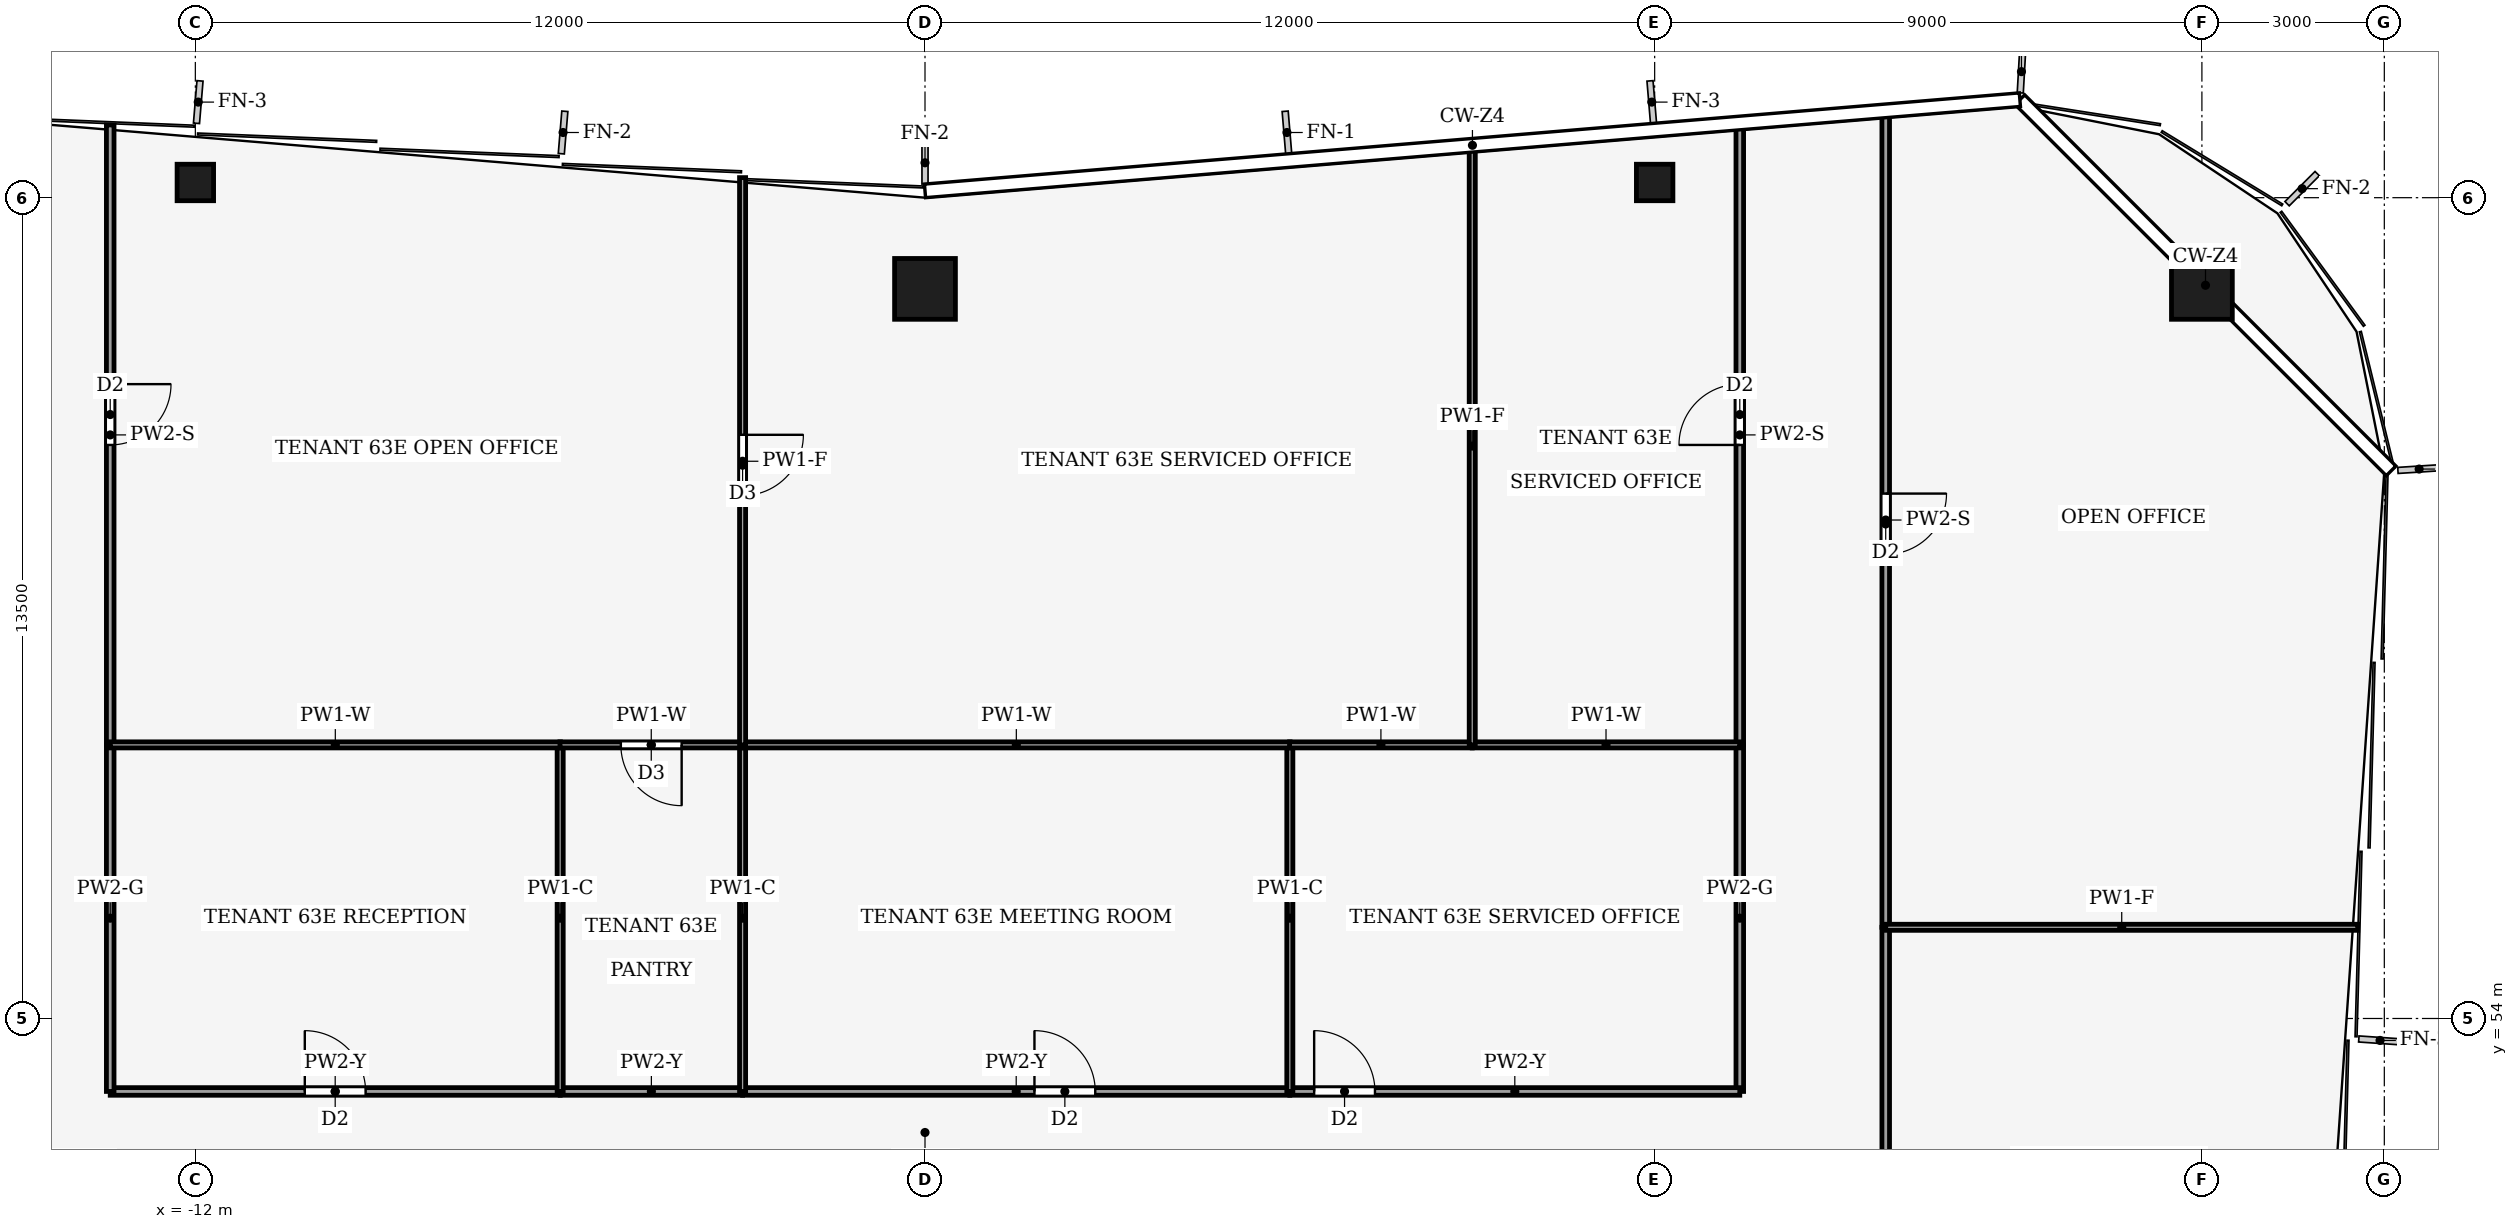
"""IFC4 building model, lengths in metres.
Left out: names, types, materials, properties, quantities, classifications, styles, units other than length and angle.
Written with IfcOpenShell. Run it as: python <this file> out.ifc"""

import sys

from ifc_helpers import new_model, si_unit, direction, frame, frame_2d, origin, origin_2d, place, context, subcontext, project, spatial, rectangle, hollow_rectangle, extrude, element, fill, save


model = new_model("IFC4")
c1 = context("Model", 3, precision=1e-05, world=origin(), true_north=direction((0.0, 1.0)))
c2 = subcontext(c1, "Body", "Model", "MODEL_VIEW")
j1 = project(units=[si_unit("LENGTHUNIT", "METRE"), si_unit("PLANEANGLEUNIT", "RADIAN")], contexts=[c1])
p1 = place(None, origin())
s1 = spatial("IfcSite", under=j1, at=p1, CompositionType="ELEMENT")
p2 = place(p1, origin())
s2 = spatial("IfcBuilding", under=s1, at=p2, CompositionType="ELEMENT")
p3 = place(p2, frame((0.0, 0.0, 274.0)))
s3 = spatial("IfcBuildingStorey", under=s2, at=p3, CompositionType="ELEMENT", Elevation=274.0)
for number, where, z_axis, x_axis in (
    (1, (0.0, 66.0, 0.0), (0.0, 0.0, 1.0), (1.0, 0.0, 0.0)),
    (2, (21.0, 66.0, 0.0), (0.0, 0.0, 1.0), (1.0, 0.0, 0.0)),
):
    element("IfcColumn", number, at=place(p3, frame(where, z_axis=z_axis, x_axis=x_axis)), inside=s3, PredefinedType="COLUMN", context=c2, shape_type="SweptSolid", body=[
        extrude(hollow_rectangle(XDim=1.0, YDim=1.0, WallThickness=0.045, at=origin_2d()), origin(), (0.0, 0.0, 1.0), 4.0),
    ])
for number, where, z_axis, x_axis in (
    (3, (-12.0, 67.75, 0.0), (0.0, 0.0, 1.0), (1.0, 0.0, 0.0)),
    (4, (12.0, 67.75, 0.0), (0.0, 0.0, 1.0), (1.0, 0.0, 0.0)),
):
    element("IfcColumn", number, at=place(p3, frame(where, z_axis=z_axis, x_axis=x_axis)), inside=s3, PredefinedType="COLUMN", context=c2, shape_type="SweptSolid", body=[
        extrude(hollow_rectangle(XDim=0.6, YDim=0.6, WallThickness=0.025, at=origin_2d()), origin(), (0.0, 0.0, 1.0), 4.0),
    ])
p4 = place(p3, frame((15.8, 55.5, 0.0), z_axis=(0.0, 0.0, 1.0), x_axis=(0.0, -1.0, 0.0)))
e5 = element("IfcWall", 5, at=p4, inside=s3, PredefinedType="PARTITIONING", context=c2, shape_type="SweptSolid", body=[
    extrude(rectangle(XDim=9.0, YDim=0.125, at=frame_2d((4.5, 0.0))), origin(), (0.0, 0.0, 1.0), 3.24),
])
p5 = place(p4, frame((4.0, 0.0, 0.0)))
e6 = element("IfcOpeningElement", 6, at=p5, cuts=e5, PredefinedType="OPENING", context=c2, shape_type="SweptSolid", body=[
    extrude(rectangle(XDim=1.0, YDim=2.1, at=frame_2d((0.5, 1.05))), frame((0.0, 0.073, 0.0), z_axis=(0.0, -1.0, 0.0), x_axis=(1.0, 0.0, 0.0)), (0.0, 0.0, 1.0), 0.145),
])
p6 = place(p3, frame((15.8, 68.897, 0.0), z_axis=(0.0, 0.0, 1.0), x_axis=(0.0, -1.0, 0.0)))
e7 = element("IfcWall", 7, at=p6, inside=s3, PredefinedType="PARTITIONING", context=c2, shape_type="SweptSolid", body=[
    extrude(rectangle(XDim=13.397, YDim=0.125, at=frame_2d((6.698, 0.0))), origin(), (0.0, 0.0, 1.0), 3.04),
])
p7 = place(p6, frame((6.263, 0.0, 0.0)))
e8 = element("IfcOpeningElement", 8, at=p7, cuts=e7, PredefinedType="OPENING", context=c2, shape_type="SweptSolid", body=[
    extrude(rectangle(XDim=1.0, YDim=2.1, at=frame_2d((0.5, 1.05))), frame((0.0, 0.073, 0.0), z_axis=(0.0, -1.0, 0.0), x_axis=(1.0, 0.0, 0.0)), (0.0, 0.0, 1.0), 0.145),
])
p8 = place(p3, frame((-13.4, 52.8, 0.0), z_axis=(0.0, 0.0, 1.0), x_axis=(1.0, 0.0, 0.0)))
e9 = element("IfcWall", 9, at=p8, inside=s3, PredefinedType="PARTITIONING", context=c2, shape_type="SweptSolid", body=[
    extrude(rectangle(XDim=7.4, YDim=0.125, at=frame_2d((3.7, 0.0))), origin(), (0.0, 0.0, 1.0), 3.24),
])
p9 = place(p8, frame((3.2, 0.0, 0.0)))
e10 = element("IfcOpeningElement", 10, at=p9, cuts=e9, PredefinedType="OPENING", context=c2, shape_type="SweptSolid", body=[
    extrude(rectangle(XDim=1.0, YDim=2.1, at=frame_2d((0.5, 1.05))), frame((0.0, 0.073, 0.0), z_axis=(0.0, -1.0, 0.0), x_axis=(1.0, 0.0, 0.0)), (0.0, 0.0, 1.0), 0.145),
])
p10 = place(p3, frame((-13.4, 52.8, 0.0), z_axis=(0.0, 0.0, 1.0), x_axis=(0.0, 1.0, 0.0)))
e11 = element("IfcWall", 11, at=p10, inside=s3, PredefinedType="PARTITIONING", context=c2, shape_type="SweptSolid", body=[
    extrude(rectangle(XDim=5.7, YDim=0.125, at=frame_2d((2.85, 0.0))), origin(), (0.0, 0.0, 1.0), 3.87),
])
p11 = place(p3, frame((-3.0, 52.8, 0.0), z_axis=(0.0, 0.0, 1.0), x_axis=(-1.0, 0.0, 0.0)))
e12 = element("IfcWall", 12, at=p11, inside=s3, PredefinedType="PARTITIONING", context=c2, shape_type="SweptSolid", body=[
    extrude(rectangle(XDim=3.0, YDim=0.125, at=frame_2d((1.5, 0.0))), origin(), (0.0, 0.0, 1.0), 3.24),
])
p12 = place(p3, frame((-3.0, 52.8, 0.0), z_axis=(0.0, 0.0, 1.0), x_axis=(1.0, 0.0, 0.0)))
e13 = element("IfcWall", 13, at=p12, inside=s3, PredefinedType="PARTITIONING", context=c2, shape_type="SweptSolid", body=[
    extrude(rectangle(XDim=9.0, YDim=0.125, at=frame_2d((4.5, 0.0))), origin(), (0.0, 0.0, 1.0), 3.24),
])
p13 = place(p12, frame((4.8, 0.0, 0.0)))
e14 = element("IfcOpeningElement", 14, at=p13, cuts=e13, PredefinedType="OPENING", context=c2, shape_type="SweptSolid", body=[
    extrude(rectangle(XDim=1.0, YDim=2.1, at=frame_2d((0.5, 1.05))), frame((0.0, 0.073, 0.0), z_axis=(0.0, -1.0, 0.0), x_axis=(1.0, 0.0, 0.0)), (0.0, 0.0, 1.0), 0.145),
])
p14 = place(p3, frame((13.4, 52.8, 0.0), z_axis=(0.0, 0.0, 1.0), x_axis=(0.0, 1.0, 0.0)))
e15 = element("IfcWall", 15, at=p14, inside=s3, PredefinedType="PARTITIONING", context=c2, shape_type="SweptSolid", body=[
    extrude(rectangle(XDim=5.7, YDim=0.125, at=frame_2d((2.85, 0.0))), origin(), (0.0, 0.0, 1.0), 3.87),
])
p15 = place(p3, frame((6.0, 52.8, 0.0), z_axis=(0.0, 0.0, 1.0), x_axis=(1.0, 0.0, 0.0)))
e16 = element("IfcWall", 16, at=p15, inside=s3, PredefinedType="PARTITIONING", context=c2, shape_type="SweptSolid", body=[
    extrude(rectangle(XDim=7.4, YDim=0.125, at=frame_2d((3.7, 0.0))), origin(), (0.0, 0.0, 1.0), 3.24),
])
p16 = place(p15, frame((0.4, 0.0, 0.0)))
e17 = element("IfcOpeningElement", 17, at=p16, cuts=e16, PredefinedType="OPENING", context=c2, shape_type="SweptSolid", body=[
    extrude(rectangle(XDim=1.0, YDim=2.1, at=frame_2d((0.5, 1.05))), frame((0.0, 0.073, 0.0), z_axis=(0.0, -1.0, 0.0), x_axis=(1.0, 0.0, 0.0)), (0.0, 0.0, 1.0), 0.145),
])
p17 = place(p3, frame((-13.4, 68.697, 0.0), z_axis=(0.0, 0.0, 1.0), x_axis=(0.0, -1.0, 0.0)))
e18 = element("IfcWall", 18, at=p17, inside=s3, PredefinedType="PARTITIONING", context=c2, shape_type="SweptSolid", body=[
    extrude(rectangle(XDim=10.197, YDim=0.125, at=frame_2d((5.098, 0.0))), origin(), (0.0, 0.0, 1.0), 3.04),
])
p18 = place(p17, frame((4.263, 0.0, 0.0)))
e19 = element("IfcOpeningElement", 19, at=p18, cuts=e18, PredefinedType="OPENING", context=c2, shape_type="SweptSolid", body=[
    extrude(rectangle(XDim=1.0, YDim=2.1, at=frame_2d((0.5, 1.05))), frame((0.0, 0.073, 0.0), z_axis=(0.0, -1.0, 0.0), x_axis=(1.0, 0.0, 0.0)), (0.0, 0.0, 1.0), 0.145),
])
p19 = place(p3, frame((13.4, 58.5, 0.0), z_axis=(0.0, 0.0, 1.0), x_axis=(0.0, 1.0, 0.0)))
e20 = element("IfcWall", 20, at=p19, inside=s3, PredefinedType="PARTITIONING", context=c2, shape_type="SweptSolid", body=[
    extrude(rectangle(XDim=10.197, YDim=0.125, at=frame_2d((5.098, 0.0))), origin(), (0.0, 0.0, 1.0), 3.04),
])
p20 = place(p19, frame((4.933, 0.0, 0.0)))
e21 = element("IfcOpeningElement", 21, at=p20, cuts=e20, PredefinedType="OPENING", context=c2, shape_type="SweptSolid", body=[
    extrude(rectangle(XDim=1.0, YDim=2.1, at=frame_2d((0.5, 1.05))), frame((0.0, 0.073, 0.0), z_axis=(0.0, -1.0, 0.0), x_axis=(1.0, 0.0, 0.0)), (0.0, 0.0, 1.0), 0.145),
])
p21 = place(p3, frame((23.563, 55.5, 0.0), z_axis=(0.0, 0.0, 1.0), x_axis=(-1.0, 0.0, 0.0)))
e22 = element("IfcWall", 22, at=p21, inside=s3, PredefinedType="PARTITIONING", context=c2, shape_type="SweptSolid", body=[
    extrude(rectangle(XDim=7.763, YDim=0.1, at=frame_2d((3.881, 0.0))), origin(), (0.0, 0.0, 1.0), 3.04),
])
p22 = place(p3, frame((-6.0, 52.8, 0.0), z_axis=(0.0, 0.0, 1.0), x_axis=(0.0, 1.0, 0.0)))
e23 = element("IfcWall", 23, at=p22, inside=s3, PredefinedType="PARTITIONING", context=c2, shape_type="SweptSolid", body=[
    extrude(rectangle(XDim=5.7, YDim=0.1, at=frame_2d((2.85, 0.0))), origin(), (0.0, 0.0, 1.0), 3.87),
])
p23 = place(p3, frame((-5.996, 58.5, 0.0), z_axis=(0.0, 0.0, 1.0), x_axis=(-1.0, 0.0, 0.0)))
e24 = element("IfcWall", 24, at=p23, inside=s3, PredefinedType="PARTITIONING", context=c2, shape_type="SweptSolid", body=[
    extrude(rectangle(XDim=7.404, YDim=0.1, at=frame_2d((3.702, 0.0))), origin(), (0.0, 0.0, 1.0), 3.24),
])
p24 = place(p3, frame((-3.0, 52.8, 0.0), z_axis=(0.0, 0.0, 1.0), x_axis=(0.0, 1.0, 0.0)))
e25 = element("IfcWall", 25, at=p24, inside=s3, PredefinedType="PARTITIONING", context=c2, shape_type="SweptSolid", body=[
    extrude(rectangle(XDim=5.7, YDim=0.1, at=frame_2d((2.85, 0.0))), origin(), (0.0, 0.0, 1.0), 3.87),
])
p25 = place(p3, frame((-3.0, 58.5, 0.0), z_axis=(0.0, 0.0, 1.0), x_axis=(-1.0, 0.0, 0.0)))
e26 = element("IfcWall", 26, at=p25, inside=s3, PredefinedType="PARTITIONING", context=c2, shape_type="SweptSolid", body=[
    extrude(rectangle(XDim=3.004, YDim=0.1, at=frame_2d((1.502, 0.0))), origin(), (0.0, 0.0, 1.0), 3.24),
])
p26 = place(p25, frame((1.002, 0.0, 0.0)))
e27 = element("IfcOpeningElement", 27, at=p26, cuts=e26, PredefinedType="OPENING", context=c2, shape_type="SweptSolid", body=[
    extrude(rectangle(XDim=1.0, YDim=2.1, at=frame_2d((0.5, 1.05))), frame((0.0, 0.06, 0.0), z_axis=(0.0, -1.0, 0.0), x_axis=(1.0, 0.0, 0.0)), (0.0, 0.0, 1.0), 0.12),
])
p27 = place(p3, frame((6.0, 52.8, 0.0), z_axis=(0.0, 0.0, 1.0), x_axis=(0.0, 1.0, 0.0)))
e28 = element("IfcWall", 28, at=p27, inside=s3, PredefinedType="PARTITIONING", context=c2, shape_type="SweptSolid", body=[
    extrude(rectangle(XDim=5.7, YDim=0.1, at=frame_2d((2.85, 0.0))), origin(), (0.0, 0.0, 1.0), 3.87),
])
p28 = place(p3, frame((6.004, 58.5, 0.0), z_axis=(0.0, 0.0, 1.0), x_axis=(-1.0, 0.0, 0.0)))
e29 = element("IfcWall", 29, at=p28, inside=s3, PredefinedType="PARTITIONING", context=c2, shape_type="SweptSolid", body=[
    extrude(rectangle(XDim=9.004, YDim=0.1, at=frame_2d((4.502, 0.0))), origin(), (0.0, 0.0, 1.0), 3.24),
])
p29 = place(p3, frame((9.0, 58.5, 0.0), z_axis=(0.0, 0.0, 1.0), x_axis=(-1.0, 0.0, 0.0)))
e30 = element("IfcWall", 30, at=p29, inside=s3, PredefinedType="PARTITIONING", context=c2, shape_type="SweptSolid", body=[
    extrude(rectangle(XDim=3.004, YDim=0.1, at=frame_2d((1.502, 0.0))), origin(), (0.0, 0.0, 1.0), 3.24),
])
p30 = place(p3, frame((13.4, 58.5, 0.0), z_axis=(0.0, 0.0, 1.0), x_axis=(-1.0, 0.0, 0.0)))
e31 = element("IfcWall", 31, at=p30, inside=s3, PredefinedType="PARTITIONING", context=c2, shape_type="SweptSolid", body=[
    extrude(rectangle(XDim=4.4, YDim=0.1, at=frame_2d((2.2, 0.0))), origin(), (0.0, 0.0, 1.0), 3.24),
])
p31 = place(p3, frame((-3.0, 67.83, 0.0), z_axis=(0.0, 0.0, 1.0), x_axis=(0.0, -1.0, 0.0)))
e32 = element("IfcWall", 32, at=p31, inside=s3, PredefinedType="PARTITIONING", context=c2, shape_type="SweptSolid", body=[
    extrude(rectangle(XDim=9.33, YDim=0.1, at=frame_2d((4.665, 0.0))), origin(), (0.0, 0.0, 1.0), 3.04),
])
p32 = place(p31, frame((4.23, 0.0, 0.0)))
e33 = element("IfcOpeningElement", 33, at=p32, cuts=e32, PredefinedType="OPENING", context=c2, shape_type="SweptSolid", body=[
    extrude(rectangle(XDim=1.0, YDim=2.1, at=frame_2d((0.5, 1.05))), frame((0.0, 0.06, 0.0), z_axis=(0.0, -1.0, 0.0), x_axis=(1.0, 0.0, 0.0)), (0.0, 0.0, 1.0), 0.12),
])
p33 = place(p3, frame((9.0, 58.5, 0.0), z_axis=(0.0, 0.0, 1.0), x_axis=(0.0, 1.0, 0.0)))
e34 = element("IfcWall", 34, at=p33, inside=s3, PredefinedType="PARTITIONING", context=c2, shape_type="SweptSolid", body=[
    extrude(rectangle(XDim=9.83, YDim=0.1, at=frame_2d((4.915, 0.0))), origin(), (0.0, 0.0, 1.0), 3.04),
])
p34 = place(p7, origin())
e35 = element("IfcDoor", 35, at=p34, inside=s3, OperationType="SINGLE_SWING_RIGHT", PredefinedType="DOOR", context=c2, shape_type="SweptSolid", body=[
    extrude(rectangle(XDim=1.0, YDim=2.1, at=frame_2d((0.5, 1.05))), frame((0.0, 0.025, 0.0), z_axis=(0.0, -1.0, 0.0), x_axis=(1.0, 0.0, 0.0)), (0.0, 0.0, 1.0), 0.05),
])
fill(e8, e35)
p35 = place(p9, origin())
e36 = element("IfcDoor", 36, at=p35, inside=s3, OperationType="SINGLE_SWING_LEFT", PredefinedType="DOOR", context=c2, shape_type="SweptSolid", body=[
    extrude(rectangle(XDim=1.0, YDim=2.1, at=frame_2d((0.5, 1.05))), frame((0.0, 0.025, 0.0), z_axis=(0.0, -1.0, 0.0), x_axis=(1.0, 0.0, 0.0)), (0.0, 0.0, 1.0), 0.05),
])
fill(e10, e36)
p36 = place(p13, origin())
e37 = element("IfcDoor", 37, at=p36, inside=s3, OperationType="SINGLE_SWING_RIGHT", PredefinedType="DOOR", context=c2, shape_type="SweptSolid", body=[
    extrude(rectangle(XDim=1.0, YDim=2.1, at=frame_2d((0.5, 1.05))), frame((0.0, 0.025, 0.0), z_axis=(0.0, -1.0, 0.0), x_axis=(1.0, 0.0, 0.0)), (0.0, 0.0, 1.0), 0.05),
])
fill(e14, e37)
p37 = place(p16, origin())
e38 = element("IfcDoor", 38, at=p37, inside=s3, OperationType="SINGLE_SWING_LEFT", PredefinedType="DOOR", context=c2, shape_type="SweptSolid", body=[
    extrude(rectangle(XDim=1.0, YDim=2.1, at=frame_2d((0.5, 1.05))), frame((0.0, 0.025, 0.0), z_axis=(0.0, -1.0, 0.0), x_axis=(1.0, 0.0, 0.0)), (0.0, 0.0, 1.0), 0.05),
])
fill(e17, e38)
p38 = place(p18, origin())
e39 = element("IfcDoor", 39, at=p38, inside=s3, OperationType="SINGLE_SWING_LEFT", PredefinedType="DOOR", context=c2, shape_type="SweptSolid", body=[
    extrude(rectangle(XDim=1.0, YDim=2.1, at=frame_2d((0.5, 1.05))), frame((0.0, 0.025, 0.0), z_axis=(0.0, -1.0, 0.0), x_axis=(1.0, 0.0, 0.0)), (0.0, 0.0, 1.0), 0.05),
])
fill(e19, e39)
p39 = place(p20, origin())
e40 = element("IfcDoor", 40, at=p39, inside=s3, OperationType="SINGLE_SWING_RIGHT", PredefinedType="DOOR", context=c2, shape_type="SweptSolid", body=[
    extrude(rectangle(XDim=1.0, YDim=2.1, at=frame_2d((0.5, 1.05))), frame((0.0, 0.025, 0.0), z_axis=(0.0, -1.0, 0.0), x_axis=(1.0, 0.0, 0.0)), (0.0, 0.0, 1.0), 0.05),
])
fill(e21, e40)
p40 = place(p26, origin())
e41 = element("IfcDoor", 41, at=p40, inside=s3, OperationType="SINGLE_SWING_RIGHT", PredefinedType="DOOR", context=c2, shape_type="SweptSolid", body=[
    extrude(rectangle(XDim=1.0, YDim=2.1, at=frame_2d((0.5, 1.05))), frame((0.0, 0.025, 0.0), z_axis=(0.0, -1.0, 0.0), x_axis=(1.0, 0.0, 0.0)), (0.0, 0.0, 1.0), 0.05),
])
fill(e27, e41)
p41 = place(p32, origin())
e42 = element("IfcDoor", 42, at=p41, inside=s3, OperationType="SINGLE_SWING_RIGHT", PredefinedType="DOOR", context=c2, shape_type="SweptSolid", body=[
    extrude(rectangle(XDim=1.0, YDim=2.1, at=frame_2d((0.5, 1.05))), frame((0.0, 0.025, 0.0), z_axis=(0.0, -1.0, 0.0), x_axis=(1.0, 0.0, 0.0)), (0.0, 0.0, 1.0), 0.05),
])
fill(e33, e42)
save(model, sys.argv[1])
